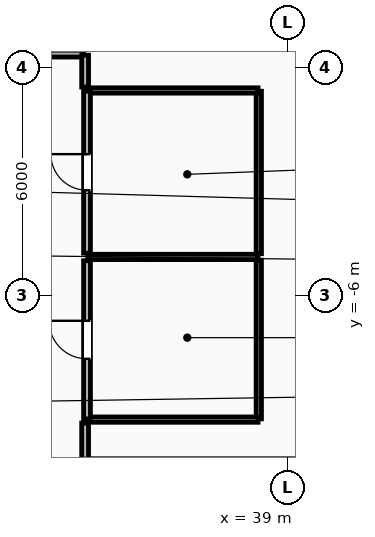
"""IFC4 building model, lengths in metres.
Left out: names, types, materials, properties, quantities, classifications, styles, units other than length and angle.
Written with IfcOpenShell. Run it as: python <this file> out.ifc"""

import sys

from ifc_helpers import new_model, si_unit, direction, frame, frame_2d, origin, place, context, subcontext, project, spatial, rectangle, extrude, element, fill, save


model = new_model("IFC4")
c1 = context("Model", 3, precision=1e-05, world=origin(), true_north=direction((0.0, 1.0)))
c2 = subcontext(c1, "Body", "Model", "MODEL_VIEW")
j1 = project(units=[si_unit("LENGTHUNIT", "METRE"), si_unit("PLANEANGLEUNIT", "RADIAN")], contexts=[c1])
p1 = place(None, origin())
s1 = spatial("IfcSite", under=j1, at=p1, CompositionType="ELEMENT")
p2 = place(p1, origin())
s2 = spatial("IfcBuilding", under=s1, at=p2, CompositionType="ELEMENT")
p3 = place(p2, frame((0.0, 0.0, 183.6)))
s3 = spatial("IfcBuildingStorey", under=s2, at=p3, CompositionType="ELEMENT", Elevation=183.6)
p4 = place(p3, frame((38.24, -9.24, 0.0), z_axis=(0.0, 0.0, 1.0), x_axis=(0.0, 1.0, 0.0)))
e1 = element("IfcWall", 1, at=p4, inside=s3, PredefinedType="PARTITIONING", context=c2, shape_type="SweptSolid", body=[
    extrude(rectangle(XDim=4.175, YDim=0.14, at=frame_2d((2.087, 0.0))), origin(), (0.0, 0.0, 1.0), 3.32),
])
p5 = place(p3, frame((38.24, -4.895, 0.0), z_axis=(0.0, 0.0, 1.0), x_axis=(0.0, 1.0, 0.0)))
e2 = element("IfcWall", 2, at=p5, inside=s3, PredefinedType="PARTITIONING", context=c2, shape_type="SweptSolid", body=[
    extrude(rectangle(XDim=4.275, YDim=0.14, at=frame_2d((2.137, 0.0))), origin(), (0.0, 0.0, 1.0), 3.32),
])
for number, where, z_axis, x_axis in (
    (3, (33.74, -0.6, 0.0), (0.0, 0.0, 1.0), (1.0, 0.0, 0.0)),
    (4, (33.74, -4.98, 0.0), (0.0, 0.0, 1.0), (1.0, 0.0, 0.0)),
    (5, (33.74, -9.26, 0.0), (0.0, 0.0, 1.0), (1.0, 0.0, 0.0)),
):
    element("IfcWall", number, at=place(p3, frame(where, z_axis=z_axis, x_axis=x_axis)), inside=s3, PredefinedType="PARTITIONING", context=c2, shape_type="SweptSolid", body=[
        extrude(rectangle(XDim=4.48, YDim=0.14, at=frame_2d((2.24, 0.0))), origin(), (0.0, 0.0, 1.0), 3.32),
    ])
p6 = place(p3, frame((33.72, -4.88, 0.0), z_axis=(0.0, 0.0, 1.0), x_axis=(0.0, 1.0, 0.0)))
e6 = element("IfcWall", 6, at=p6, inside=s3, PredefinedType="PARTITIONING", context=c2, shape_type="SweptSolid", body=[
    extrude(rectangle(XDim=4.26, YDim=0.18, at=frame_2d((2.13, 0.0))), origin(), (0.0, 0.0, 1.0), 3.32),
])
p7 = place(p6, frame((1.655, 0.0, 0.0)))
e7 = element("IfcOpeningElement", 7, at=p7, cuts=e6, PredefinedType="OPENING", context=c2, shape_type="SweptSolid", body=[
    extrude(rectangle(XDim=0.95, YDim=2.1, at=frame_2d((0.475, 1.05))), frame((0.0, 0.1, 0.0), z_axis=(0.0, -1.0, 0.0), x_axis=(1.0, 0.0, 0.0)), (0.0, 0.0, 1.0), 0.2),
])
p8 = place(p3, frame((33.72, -9.24, 0.0), z_axis=(0.0, 0.0, 1.0), x_axis=(0.0, 1.0, 0.0)))
e8 = element("IfcWall", 8, at=p8, inside=s3, PredefinedType="PARTITIONING", context=c2, shape_type="SweptSolid", body=[
    extrude(rectangle(XDim=4.16, YDim=0.18, at=frame_2d((2.08, 0.0))), origin(), (0.0, 0.0, 1.0), 3.32),
])
p9 = place(p8, frame((1.58, 0.0, 0.0)))
e9 = element("IfcOpeningElement", 9, at=p9, cuts=e8, PredefinedType="OPENING", context=c2, shape_type="SweptSolid", body=[
    extrude(rectangle(XDim=1.0, YDim=2.15, at=frame_2d((0.5, 1.075))), frame((0.0, 0.1, 0.0), z_axis=(0.0, -1.0, 0.0), x_axis=(1.0, 0.0, 0.0)), (0.0, 0.0, 1.0), 0.2),
])
p10 = place(p3, frame((33.628, 0.37, 0.0), z_axis=(0.0, 0.0, 1.0), x_axis=(-1.0, 0.0, 0.0)))
e10 = element("IfcWall", 10, at=p10, inside=s3, PredefinedType="PARTITIONING", context=c2, shape_type="SweptSolid", body=[
    extrude(rectangle(XDim=5.628, YDim=0.18, at=frame_2d((2.814, 0.0))), origin(), (0.0, 0.0, 1.0), 3.32),
])
p11 = place(p3, frame((33.67, -10.3, 0.0), z_axis=(0.0, 0.0, 1.0), x_axis=(0.0, 1.0, 0.0)))
e11 = element("IfcWall", 11, at=p11, inside=s3, PredefinedType="PARTITIONING", context=c2, shape_type="SweptSolid", body=[
    extrude(rectangle(XDim=0.949, YDim=0.18, at=frame_2d((0.474, 0.0))), origin(), (0.0, 0.0, 1.0), 3.32),
])
p12 = place(p3, frame((33.67, -0.509, 0.0), z_axis=(0.0, 0.0, 1.0), x_axis=(0.0, 1.0, 0.0)))
e12 = element("IfcWall", 12, at=p12, inside=s3, PredefinedType="PARTITIONING", context=c2, shape_type="SweptSolid", body=[
    extrude(rectangle(XDim=0.837, YDim=0.18, at=frame_2d((0.418, 0.0))), origin(), (0.0, 0.0, 1.0), 3.32),
])
p13 = place(p7, origin())
e13 = element("IfcDoor", 13, at=p13, inside=s3, OperationType="SINGLE_SWING_RIGHT", PredefinedType="DOOR", context=c2, shape_type="SweptSolid", body=[
    extrude(rectangle(XDim=0.95, YDim=2.1, at=frame_2d((0.475, 1.05))), frame((0.0, 0.025, 0.0), z_axis=(0.0, -1.0, 0.0), x_axis=(1.0, 0.0, 0.0)), (0.0, 0.0, 1.0), 0.05),
])
fill(e7, e13)
p14 = place(p9, origin())
e14 = element("IfcDoor", 14, at=p14, inside=s3, OperationType="SINGLE_SWING_RIGHT", PredefinedType="DOOR", context=c2, shape_type="SweptSolid", body=[
    extrude(rectangle(XDim=1.0, YDim=2.15, at=frame_2d((0.5, 1.075))), frame((0.0, 0.025, 0.0), z_axis=(0.0, -1.0, 0.0), x_axis=(1.0, 0.0, 0.0)), (0.0, 0.0, 1.0), 0.05),
])
fill(e9, e14)
save(model, sys.argv[1])
